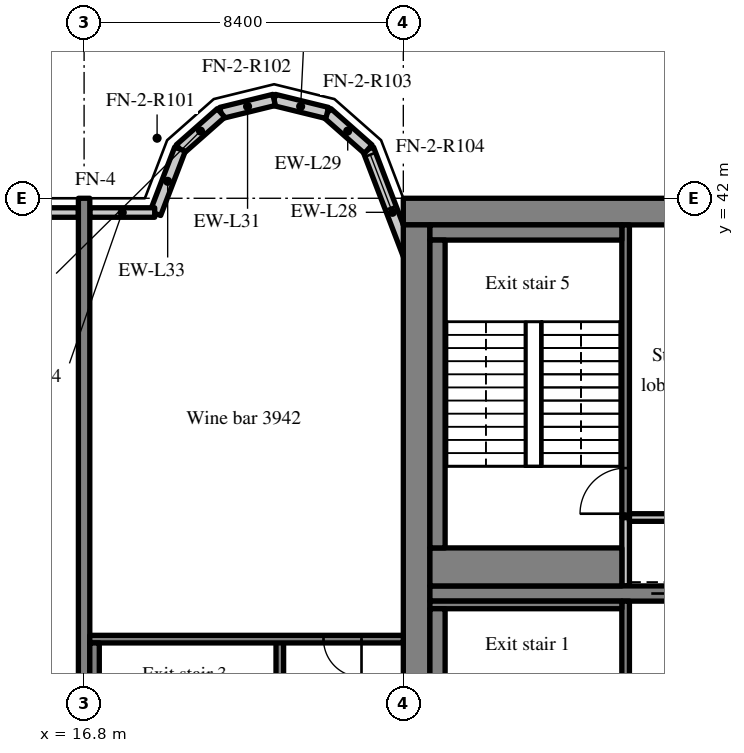
"""IFC4 building model, lengths in metres.
Left out: names, types, materials, properties, quantities, classifications, styles, units other than length and angle.
Written with IfcOpenShell. Run it as: python <this file> out.ifc"""

import sys

from ifc_helpers import new_model, si_unit, direction, frame, frame_2d, origin, place, context, subcontext, project, spatial, rectangle, extrude, source, transform, mapped, element, fill, save


model = new_model("IFC4")
c1 = context("Model", 3, precision=1e-05, world=origin(), true_north=direction((0.0, 1.0)))
c2 = subcontext(c1, "Body", "Model", "MODEL_VIEW")
j1 = project(units=[si_unit("LENGTHUNIT", "METRE"), si_unit("PLANEANGLEUNIT", "RADIAN")], contexts=[c1])
p1 = place(None, origin())
s1 = spatial("IfcSite", under=j1, at=p1, CompositionType="ELEMENT")
p2 = place(p1, origin())
s2 = spatial("IfcBuilding", under=s1, at=p2, CompositionType="ELEMENT")
p3 = place(p2, frame((0.0, 0.0, 163.0)))
s3 = spatial("IfcBuildingStorey", under=s2, at=p3, CompositionType="ELEMENT", Elevation=163.0)
m1 = source(origin(), c2, "Body", "SweptSolid", [
    extrude(rectangle(XDim=50.4, YDim=0.7, at=frame_2d((25.2, 0.0))), origin(), (0.0, 0.0, 1.0), 3.52),
])
p4 = place(p3, frame((25.2, 41.65, 0.0), z_axis=(0.0, 0.0, 1.0), x_axis=(1.0, 0.0, 0.0)))
e1 = element("IfcWall", 1, at=p4, inside=s3, PredefinedType="SHEAR", context=c2, shape_type="MappedRepresentation", body=[
    mapped(m1, transform((0.0, 0.0, 0.0), scale=1.0)),
])
m2 = source(origin(), c2, "Body", "SweptSolid", [
    extrude(rectangle(XDim=18.6, YDim=0.7, at=frame_2d((9.3, 0.0))), origin(), (0.0, 0.0, 1.0), 3.52),
])
p5 = place(p3, frame((25.55, 22.7, 0.0), z_axis=(0.0, 0.0, 1.0), x_axis=(0.0, 1.0, 0.0)))
e2 = element("IfcWall", 2, at=p5, inside=s3, PredefinedType="SHEAR", context=c2, shape_type="MappedRepresentation", body=[
    mapped(m2, transform((0.0, 0.0, 0.0), scale=1.0)),
])
m3 = source(origin(), c2, "Body", "SweptSolid", [
    extrude(rectangle(XDim=7.5, YDim=0.4, at=frame_2d((3.75, 0.0))), origin(), (0.0, 0.0, 1.0), 3.52),
])
p6 = place(p3, frame((25.9, 31.6, 0.0), z_axis=(0.0, 0.0, 1.0), x_axis=(1.0, 0.0, 0.0)))
e3 = element("IfcWall", 3, at=p6, inside=s3, PredefinedType="SHEAR", context=c2, shape_type="MappedRepresentation", body=[
    mapped(m3, transform((0.0, 0.0, 0.0), scale=1.0)),
])
m4 = source(origin(), c2, "Body", "SweptSolid", [
    extrude(rectangle(XDim=1.1, YDim=2.1, at=frame_2d((0.55, 1.05))), frame((0.0, 0.21, 0.0), z_axis=(0.0, -1.0, 0.0), x_axis=(1.0, 0.0, 0.0)), (0.0, 0.0, 1.0), 0.42),
])
p7 = place(p6, frame((5.825, 0.0, 0.0)))
e4 = element("IfcOpeningElement", 4, at=p7, cuts=e3, PredefinedType="OPENING", context=c2, shape_type="MappedRepresentation", body=[
    mapped(m4, transform((0.0, 0.0, 0.0), scale=1.0)),
])
m5 = source(origin(), c2, "Body", "SweptSolid", [
    extrude(rectangle(XDim=20.0, YDim=0.3, at=frame_2d((10.0, 0.0))), origin(), (0.0, 0.0, 1.0), 3.52),
])
p8 = place(p3, frame((16.8, 22.0, 0.0), z_axis=(0.0, 0.0, 1.0), x_axis=(0.0, 1.0, 0.0)))
e5 = element("IfcWall", 5, at=p8, inside=s3, PredefinedType="SHEAR", context=c2, shape_type="MappedRepresentation", body=[
    mapped(m5, transform((0.0, 0.0, 0.0), scale=1.0)),
])
m6 = source(origin(), c2, "Body", "SweptSolid", [
    extrude(rectangle(XDim=3.559, YDim=0.3, at=frame_2d((1.78, 0.0))), origin(), (0.0, 0.0, 1.0), 3.52),
])
p9 = place(p3, frame((25.55, 39.969, 0.0), z_axis=(0.0, 0.0, 1.0), x_axis=(-0.35779745313, 0.933799219604, 0.0)))
e6 = element("IfcWall", 6, at=p9, inside=s3, PredefinedType="SOLIDWALL", context=c2, shape_type="MappedRepresentation", body=[
    mapped(m6, transform((0.0, 0.0, 0.0), scale=1.0)),
])
m7 = source(origin(), c2, "Body", "SweptSolid", [
    extrude(rectangle(XDim=1.5, YDim=2.0, at=frame_2d((0.75, 1.0))), frame((0.0, 0.16, 0.0), z_axis=(0.0, -1.0, 0.0), x_axis=(1.0, 0.0, 0.0)), (0.0, 0.0, 1.0), 0.32),
])
p10 = place(p9, frame((1.903, 0.0, 0.9)))
e7 = element("IfcOpeningElement", 7, at=p10, cuts=e6, PredefinedType="OPENING", context=c2, shape_type="MappedRepresentation", body=[
    mapped(m7, transform((0.0, 0.0, 0.0), scale=1.0)),
])
m8 = source(origin(), c2, "Body", "SweptSolid", [
    extrude(rectangle(XDim=1.44, YDim=0.3, at=frame_2d((0.72, 0.0))), origin(), (0.0, 0.0, 1.0), 3.52),
])
p11 = place(p3, frame((24.277, 43.292, 0.0), z_axis=(0.0, 0.0, 1.0), x_axis=(-0.749649827867, 0.661834673902, 0.0)))
e8 = element("IfcWall", 8, at=p11, inside=s3, PredefinedType="SOLIDWALL", context=c2, shape_type="MappedRepresentation", body=[
    mapped(m8, transform((0.0, 0.0, 0.0), scale=1.0)),
])
m9 = source(origin(), c2, "Body", "SweptSolid", [
    extrude(rectangle(XDim=1.438, YDim=0.3, at=frame_2d((0.719, 0.0))), origin(), (0.0, 0.0, 1.0), 3.52),
])
p12 = place(p3, frame((23.197, 44.245, 0.0), z_axis=(0.0, 0.0, 1.0), x_axis=(-0.971152283879, 0.238460146601, 0.0)))
e9 = element("IfcWall", 9, at=p12, inside=s3, PredefinedType="SOLIDWALL", context=c2, shape_type="MappedRepresentation", body=[
    mapped(m9, transform((0.0, 0.0, 0.0), scale=1.0)),
])
m10 = source(origin(), c2, "Body", "SweptSolid", [
    extrude(rectangle(XDim=1.439, YDim=0.3, at=frame_2d((0.719, 0.0))), origin(), (0.0, 0.0, 1.0), 3.52),
])
p13 = place(p3, frame((21.8, 44.588, 0.0), z_axis=(0.0, 0.0, 1.0), x_axis=(-0.971161932466, -0.238420848351, 0.0)))
e10 = element("IfcWall", 10, at=p13, inside=s3, PredefinedType="SOLIDWALL", context=c2, shape_type="MappedRepresentation", body=[
    mapped(m10, transform((0.0, 0.0, 0.0), scale=1.0)),
])
m11 = source(origin(), c2, "Body", "SweptSolid", [
    extrude(rectangle(XDim=1.44, YDim=0.3, at=frame_2d((0.72, 0.0))), origin(), (0.0, 0.0, 1.0), 3.52),
])
p14 = place(p3, frame((20.403, 44.245, 0.0), z_axis=(0.0, 0.0, 1.0), x_axis=(-0.74957555648, -0.661918790432, 0.0)))
e11 = element("IfcWall", 11, at=p14, inside=s3, PredefinedType="SOLIDWALL", context=c2, shape_type="MappedRepresentation", body=[
    mapped(m11, transform((0.0, 0.0, 0.0), scale=1.0)),
])
m12 = source(origin(), c2, "Body", "SweptSolid", [
    extrude(rectangle(XDim=1.812, YDim=0.3, at=frame_2d((0.906, 0.0))), origin(), (0.0, 0.0, 1.0), 3.52),
])
p15 = place(p3, frame((19.323, 43.292, 0.0), z_axis=(0.0, 0.0, 1.0), x_axis=(-0.357877270961, -0.93376863244, 0.0)))
e12 = element("IfcWall", 12, at=p15, inside=s3, PredefinedType="SOLIDWALL", context=c2, shape_type="MappedRepresentation", body=[
    mapped(m12, transform((0.0, 0.0, 0.0), scale=1.0)),
])
m13 = source(origin(), c2, "Body", "SweptSolid", [
    extrude(rectangle(XDim=4.094, YDim=0.25, at=frame_2d((2.047, 0.0))), origin(), (0.0, 0.0, 1.0), 2.87),
])
p16 = place(p3, frame((16.65, 41.625, 0.0), z_axis=(0.0, 0.0, 1.0), x_axis=(-1.0, 0.0, 0.0)))
e13 = element("IfcWall", 13, at=p16, inside=s3, PredefinedType="SOLIDWALL", context=c2, shape_type="MappedRepresentation", body=[
    mapped(m13, transform((0.0, 0.0, 0.0), scale=1.0)),
])
m14 = source(origin(), c2, "Body", "SweptSolid", [
    extrude(rectangle(XDim=1.5, YDim=1.5, at=frame_2d((0.75, 0.75))), frame((0.0, 0.135, 0.0), z_axis=(0.0, -1.0, 0.0), x_axis=(1.0, 0.0, 0.0)), (0.0, 0.0, 1.0), 0.27),
])
p17 = place(p16, frame((1.297, 0.0, 0.9)))
e14 = element("IfcOpeningElement", 14, at=p17, cuts=e13, PredefinedType="OPENING", context=c2, shape_type="MappedRepresentation", body=[
    mapped(m14, transform((0.0, 0.0, 0.0), scale=1.0)),
])
m15 = source(origin(), c2, "Body", "SweptSolid", [
    extrude(rectangle(XDim=1.708, YDim=0.25, at=frame_2d((0.854, 0.0))), origin(), (0.0, 0.0, 1.0), 2.87),
])
p18 = place(p3, frame((18.658, 41.625, 0.0), z_axis=(0.0, 0.0, 1.0), x_axis=(-1.0, 0.0, 0.0)))
e15 = element("IfcWall", 15, at=p18, inside=s3, PredefinedType="SOLIDWALL", context=c2, shape_type="MappedRepresentation", body=[
    mapped(m15, transform((0.0, 0.0, 0.0), scale=1.0)),
])
m16 = source(origin(), c2, "Body", "SweptSolid", [
    extrude(rectangle(XDim=8.7, YDim=0.2, at=frame_2d((4.35, 0.0))), origin(), (0.0, 0.0, 1.0), 3.52),
])
p19 = place(p3, frame((31.05, 22.7, 0.0), z_axis=(0.0, 0.0, 1.0), x_axis=(0.0, 1.0, 0.0)))
e16 = element("IfcWall", 16, at=p19, inside=s3, PredefinedType="SOLIDWALL", context=c2, shape_type="MappedRepresentation", body=[
    mapped(m16, transform((0.0, 0.0, 0.0), scale=1.0)),
])
m17 = source(origin(), c2, "Body", "SweptSolid", [
    extrude(rectangle(XDim=1.2, YDim=2.1, at=frame_2d((0.6, 1.05))), frame((0.0, 0.11, 0.0), z_axis=(0.0, -1.0, 0.0), x_axis=(1.0, 0.0, 0.0)), (0.0, 0.0, 1.0), 0.22),
])
p20 = place(p19, frame((0.9, 0.0, 0.0)))
e17 = element("IfcOpeningElement", 17, at=p20, cuts=e16, PredefinedType="OPENING", context=c2, shape_type="MappedRepresentation", body=[
    mapped(m17, transform((0.0, 0.0, 0.0), scale=1.0)),
])
m18 = source(origin(), c2, "Body", "SweptSolid", [
    extrude(rectangle(XDim=1.8, YDim=0.2, at=frame_2d((0.9, 0.0))), origin(), (0.0, 0.0, 1.0), 3.52),
])
p21 = place(p3, frame((31.05, 31.8, 0.0), z_axis=(0.0, 0.0, 1.0), x_axis=(0.0, 1.0, 0.0)))
e18 = element("IfcWall", 18, at=p21, inside=s3, PredefinedType="SOLIDWALL", context=c2, shape_type="MappedRepresentation", body=[
    mapped(m18, transform((0.0, 0.0, 0.0), scale=1.0)),
])
m19 = source(origin(), c2, "Body", "SweptSolid", [
    extrude(rectangle(XDim=2.25, YDim=0.2, at=frame_2d((1.125, 0.0))), origin(), (0.0, 0.0, 1.0), 3.52),
])
p22 = place(p3, frame((31.15, 33.6, 0.0), z_axis=(0.0, 0.0, 1.0), x_axis=(1.0, 0.0, 0.0)))
e19 = element("IfcWall", 19, at=p22, inside=s3, PredefinedType="SOLIDWALL", context=c2, shape_type="MappedRepresentation", body=[
    mapped(m19, transform((0.0, 0.0, 0.0), scale=1.0)),
])
m20 = source(origin(), c2, "Body", "SweptSolid", [
    extrude(rectangle(XDim=7.7, YDim=0.2, at=frame_2d((3.85, 0.0))), origin(), (0.0, 0.0, 1.0), 3.52),
])
p23 = place(p3, frame((31.05, 33.6, 0.0), z_axis=(0.0, 0.0, 1.0), x_axis=(0.0, 1.0, 0.0)))
e20 = element("IfcWall", 20, at=p23, inside=s3, PredefinedType="SOLIDWALL", context=c2, shape_type="MappedRepresentation", body=[
    mapped(m20, transform((0.0, 0.0, 0.0), scale=1.0)),
])
p24 = place(p23, frame((0.1, 0.0, 0.0)))
e21 = element("IfcOpeningElement", 21, at=p24, cuts=e20, PredefinedType="OPENING", context=c2, shape_type="MappedRepresentation", body=[
    mapped(m17, transform((0.0, 0.0, 0.0), scale=1.0)),
])
m21 = source(origin(), c2, "Body", "SweptSolid", [
    extrude(rectangle(XDim=8.3, YDim=0.2, at=frame_2d((4.15, 0.0))), origin(), (0.0, 0.0, 1.0), 3.52),
])
p25 = place(p3, frame((21.95, 22.1, 0.0), z_axis=(0.0, 0.0, 1.0), x_axis=(0.0, 1.0, 0.0)))
e22 = element("IfcWall", 22, at=p25, inside=s3, PredefinedType="SOLIDWALL", context=c2, shape_type="MappedRepresentation", body=[
    mapped(m21, transform((0.0, 0.0, 0.0), scale=1.0)),
])
p26 = place(p25, frame((0.6, 0.0, 0.0)))
e23 = element("IfcOpeningElement", 23, at=p26, cuts=e22, PredefinedType="OPENING", context=c2, shape_type="MappedRepresentation", body=[
    mapped(m17, transform((0.0, 0.0, 0.0), scale=1.0)),
])
m22 = source(origin(), c2, "Body", "SweptSolid", [
    extrude(rectangle(XDim=8.25, YDim=0.2, at=frame_2d((4.125, 0.0))), origin(), (0.0, 0.0, 1.0), 3.52),
])
p27 = place(p3, frame((16.95, 30.4, 0.0), z_axis=(0.0, 0.0, 1.0), x_axis=(1.0, 0.0, 0.0)))
e24 = element("IfcWall", 24, at=p27, inside=s3, PredefinedType="SOLIDWALL", context=c2, shape_type="MappedRepresentation", body=[
    mapped(m22, transform((0.0, 0.0, 0.0), scale=1.0)),
])
m23 = source(origin(), c2, "Body", "SweptSolid", [
    extrude(rectangle(XDim=1.0, YDim=2.1, at=frame_2d((0.5, 1.05))), frame((0.0, 0.11, 0.0), z_axis=(0.0, -1.0, 0.0), x_axis=(1.0, 0.0, 0.0)), (0.0, 0.0, 1.0), 0.22),
])
p28 = place(p27, frame((6.15, 0.0, 0.0)))
e25 = element("IfcOpeningElement", 25, at=p28, cuts=e24, PredefinedType="OPENING", context=c2, shape_type="MappedRepresentation", body=[
    mapped(m23, transform((0.0, 0.0, 0.0), scale=1.0)),
])
m24 = source(origin(), c2, "Body", "SweptSolid", [
    extrude(rectangle(XDim=5.05, YDim=0.2, at=frame_2d((2.525, 0.0))), origin(), (0.0, 0.0, 1.0), 3.52),
])
p29 = place(p3, frame((25.9, 31.3, 0.0), z_axis=(0.0, 0.0, 1.0), x_axis=(1.0, 0.0, 0.0)))
e26 = element("IfcWall", 26, at=p29, inside=s3, PredefinedType="SOLIDWALL", context=c2, shape_type="MappedRepresentation", body=[
    mapped(m24, transform((0.0, 0.0, 0.0), scale=1.0)),
])
m25 = source(origin(), c2, "Body", "SweptSolid", [
    extrude(rectangle(XDim=8.1, YDim=0.4, at=frame_2d((4.05, 0.0))), origin(), (0.0, 0.0, 1.0), 3.52),
])
p30 = place(p3, frame((26.1, 23.1, 0.0), z_axis=(0.0, 0.0, 1.0), x_axis=(0.0, 1.0, 0.0)))
e27 = element("IfcWall", 27, at=p30, inside=s3, PredefinedType="SOLIDWALL", context=c2, shape_type="MappedRepresentation", body=[
    mapped(m25, transform((0.0, 0.0, 0.0), scale=1.0)),
])
m26 = source(origin(), c2, "Body", "SweptSolid", [
    extrude(rectangle(XDim=8.1, YDim=0.25, at=frame_2d((4.05, 0.0))), origin(), (0.0, 0.0, 1.0), 3.52),
])
p31 = place(p3, frame((17.075, 22.2, 0.0), z_axis=(0.0, 0.0, 1.0), x_axis=(0.0, 1.0, 0.0)))
e28 = element("IfcWall", 28, at=p31, inside=s3, PredefinedType="SOLIDWALL", context=c2, shape_type="MappedRepresentation", body=[
    mapped(m26, transform((0.0, 0.0, 0.0), scale=1.0)),
])
m27 = source(origin(), c2, "Body", "SweptSolid", [
    extrude(rectangle(XDim=5.05, YDim=0.4, at=frame_2d((2.525, 0.0))), origin(), (0.0, 0.0, 1.0), 3.52),
])
p32 = place(p3, frame((25.9, 41.1, 0.0), z_axis=(0.0, 0.0, 1.0), x_axis=(1.0, 0.0, 0.0)))
e29 = element("IfcWall", 29, at=p32, inside=s3, PredefinedType="SOLIDWALL", context=c2, shape_type="MappedRepresentation", body=[
    mapped(m27, transform((0.0, 0.0, 0.0), scale=1.0)),
])
m28 = source(origin(), c2, "Body", "SweptSolid", [
    extrude(rectangle(XDim=5.05, YDim=1.0, at=frame_2d((2.525, 0.0))), origin(), (0.0, 0.0, 1.0), 3.52),
])
p33 = place(p3, frame((25.9, 32.3, 0.0), z_axis=(0.0, 0.0, 1.0), x_axis=(1.0, 0.0, 0.0)))
e30 = element("IfcWall", 30, at=p33, inside=s3, PredefinedType="SOLIDWALL", context=c2, shape_type="MappedRepresentation", body=[
    mapped(m28, transform((0.0, 0.0, 0.0), scale=1.0)),
])
p34 = place(p3, frame((26.1, 32.8, 0.0), z_axis=(0.0, 0.0, 1.0), x_axis=(0.0, 1.0, 0.0)))
e31 = element("IfcWall", 31, at=p34, inside=s3, PredefinedType="SOLIDWALL", context=c2, shape_type="MappedRepresentation", body=[
    mapped(m25, transform((0.0, 0.0, 0.0), scale=1.0)),
])
m29 = source(origin(), c2, "Body", "SweptSolid", [
    extrude(rectangle(XDim=1.5, YDim=2.0, at=frame_2d((0.75, 1.0))), frame((0.0, 0.03, 0.0), z_axis=(0.0, -1.0, 0.0), x_axis=(1.0, 0.0, 0.0)), (0.0, 0.0, 1.0), 0.06),
])
p35 = place(p10, origin())
e32 = element("IfcWindow", 32, at=p35, inside=s3, PartitioningType="SINGLE_PANEL", PredefinedType="WINDOW", context=c2, shape_type="MappedRepresentation", body=[
    mapped(m29, transform((0.0, 0.0, 0.0), scale=1.0)),
])
fill(e7, e32)
m30 = source(origin(), c2, "Body", "SweptSolid", [
    extrude(rectangle(XDim=1.1, YDim=2.1, at=frame_2d((0.55, 1.05))), frame((0.0, 0.025, 0.0), z_axis=(0.0, -1.0, 0.0), x_axis=(1.0, 0.0, 0.0)), (0.0, 0.0, 1.0), 0.05),
])
p36 = place(p7, origin())
e33 = element("IfcDoor", 33, at=p36, inside=s3, OperationType="SLIDING_TO_LEFT", PredefinedType="DOOR", context=c2, shape_type="MappedRepresentation", body=[
    mapped(m30, transform((0.0, 0.0, 0.0), scale=1.0)),
])
fill(e4, e33)
m31 = source(origin(), c2, "Body", "SweptSolid", [
    extrude(rectangle(XDim=1.2, YDim=2.1, at=frame_2d((0.6, 1.05))), frame((0.0, 0.025, 0.0), z_axis=(0.0, -1.0, 0.0), x_axis=(1.0, 0.0, 0.0)), (0.0, 0.0, 1.0), 0.05),
])
p37 = place(p24, origin())
e34 = element("IfcDoor", 34, at=p37, inside=s3, OperationType="SINGLE_SWING_LEFT", PredefinedType="DOOR", context=c2, shape_type="MappedRepresentation", body=[
    mapped(m31, transform((0.0, 0.0, 0.0), scale=1.0)),
])
fill(e21, e34)
m32 = source(origin(), c2, "Body", "SweptSolid", [
    extrude(rectangle(XDim=1.0, YDim=2.1, at=frame_2d((0.5, 1.05))), frame((0.0, 0.025, 0.0), z_axis=(0.0, -1.0, 0.0), x_axis=(1.0, 0.0, 0.0)), (0.0, 0.0, 1.0), 0.05),
])
p38 = place(p28, origin())
e35 = element("IfcDoor", 35, at=p38, inside=s3, OperationType="SINGLE_SWING_RIGHT", PredefinedType="DOOR", context=c2, shape_type="MappedRepresentation", body=[
    mapped(m32, transform((0.0, 0.0, 0.0), scale=1.0)),
])
fill(e25, e35)
save(model, sys.argv[1])
